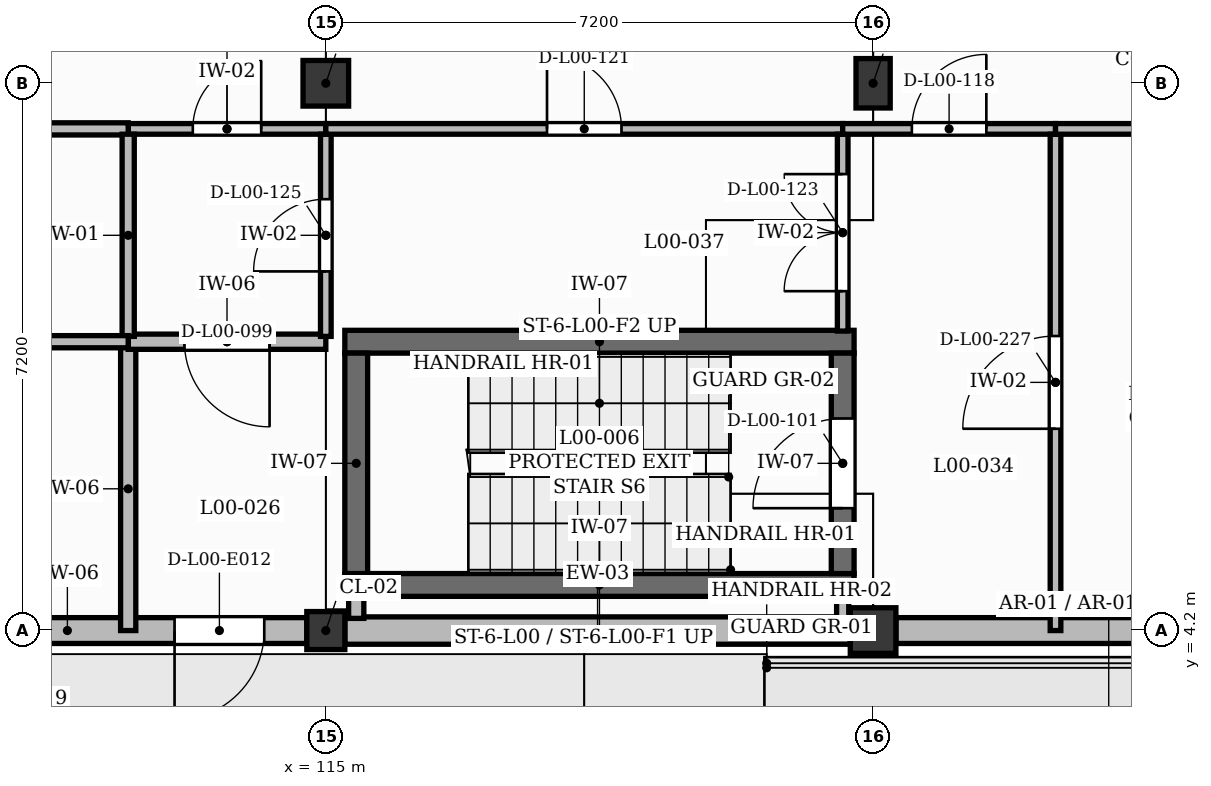
"""IFC4 building model, lengths in metres.
Left out: names, types, materials, properties, quantities, classifications, styles, units other than length and angle.
Written with IfcOpenShell. Run it as: python <this file> out.ifc"""

import sys

from ifc_helpers import new_model, si_unit, direction, frame, frame_2d, origin, origin_2d, place, context, subcontext, project, spatial, rectangle, extrude, element, fill, save


model = new_model("IFC4")
c1 = context("Model", 3, precision=1e-05, world=origin(), true_north=direction((0.0, 1.0)))
c2 = subcontext(c1, "Body", "Model", "MODEL_VIEW")
j1 = project(units=[si_unit("LENGTHUNIT", "METRE"), si_unit("PLANEANGLEUNIT", "RADIAN")], contexts=[c1])
p1 = place(None, origin())
s1 = spatial("IfcSite", under=j1, at=p1, CompositionType="ELEMENT")
p2 = place(p1, origin())
s2 = spatial("IfcBuilding", under=s1, at=p2, CompositionType="ELEMENT")
p3 = place(p2, origin())
s3 = spatial("IfcBuildingStorey", under=s2, at=p3, CompositionType="ELEMENT", Elevation=0.0)
p4 = place(p3, frame((115.0, 4.2, 0.0), z_axis=(0.0, 0.0, 1.0), x_axis=(1.0, 0.0, 0.0)))
e1 = element("IfcColumn", 1, at=p4, inside=s3, PredefinedType="COLUMN", context=c2, shape_type="SweptSolid", body=[
    extrude(rectangle(XDim=0.5, YDim=0.5, at=origin_2d()), origin(), (0.0, 0.0, 1.0), 4.2),
])
for number, where, z_axis, x_axis in (
    (2, (115.0, 11.4, 0.0), (0.0, 0.0, 1.0), (1.0, 0.0, 0.0)),
    (3, (122.2, 4.2, 0.0), (0.0, 0.0, 1.0), (1.0, 0.0, 0.0)),
):
    element("IfcColumn", number, at=place(p3, frame(where, z_axis=z_axis, x_axis=x_axis)), inside=s3, PredefinedType="COLUMN", context=c2, shape_type="SweptSolid", body=[
        extrude(rectangle(XDim=0.6, YDim=0.6, at=origin_2d()), origin(), (0.0, 0.0, 1.0), 4.2),
    ])
p5 = place(p3, frame((122.2, 11.4, 0.0), z_axis=(0.0, 0.0, 1.0), x_axis=(1.0, 0.0, 0.0)))
e4 = element("IfcColumn", 4, at=p5, inside=s3, PredefinedType="COLUMN", context=c2, shape_type="SweptSolid", body=[
    extrude(rectangle(XDim=0.45, YDim=0.65, at=origin_2d()), origin(), (0.0, 0.0, 1.0), 4.2),
])
p6 = place(p3, frame((108.025, 4.2, 0.0), z_axis=(0.0, 0.0, 1.0), x_axis=(1.0, 0.0, 0.0)))
e5 = element("IfcWall", 5, at=p6, inside=s3, PredefinedType="SOLIDWALL", context=c2, shape_type="SweptSolid", body=[
    extrude(rectangle(XDim=6.725, YDim=0.34, at=frame_2d((3.363, 0.0))), origin(), (0.0, 0.0, 1.0), 3.68),
])
p7 = place(p6, frame((4.985, 0.0, 0.0)))
e6 = element("IfcOpeningElement", 6, at=p7, cuts=e5, PredefinedType="OPENING", context=c2, shape_type="SweptSolid", body=[
    extrude(rectangle(XDim=1.18, YDim=2.2, at=frame_2d((0.59, 1.1))), frame((0.0, 0.18, 0.0), z_axis=(0.0, -1.0, 0.0), x_axis=(1.0, 0.0, 0.0)), (0.0, 0.0, 1.0), 0.36),
])
p8 = place(p6, frame((1.522, 0.0, 1.35)))
e7 = element("IfcOpeningElement", 7, at=p8, cuts=e5, PredefinedType="OPENING", context=c2, shape_type="SweptSolid", body=[
    extrude(rectangle(XDim=1.45, YDim=1.4, at=frame_2d((0.725, 0.7))), frame((0.0, 0.18, 0.0), z_axis=(0.0, -1.0, 0.0), x_axis=(1.0, 0.0, 0.0)), (0.0, 0.0, 1.0), 0.36),
])
p9 = place(p3, frame((115.25, 4.2, 0.0), z_axis=(0.0, 0.0, 1.0), x_axis=(1.0, 0.0, 0.0)))
e8 = element("IfcWall", 8, at=p9, inside=s3, PredefinedType="SOLIDWALL", context=c2, shape_type="SweptSolid", body=[
    extrude(rectangle(XDim=6.65, YDim=0.36, at=frame_2d((3.325, 0.0))), origin(), (0.0, 0.0, 1.0), 3.68),
])
p10 = place(p3, frame((122.5, 4.2, 0.0), z_axis=(0.0, 0.0, 1.0), x_axis=(1.0, 0.0, 0.0)))
e9 = element("IfcWall", 9, at=p10, inside=s3, PredefinedType="SOLIDWALL", context=c2, shape_type="SweptSolid", body=[
    extrude(rectangle(XDim=5.85, YDim=0.34, at=frame_2d((2.925, 0.0))), origin(), (0.0, 0.0, 1.0), 3.68),
])
p11 = place(p10, frame((3.305, 0.0, 1.0)))
e10 = element("IfcOpeningElement", 10, at=p11, cuts=e9, PredefinedType="OPENING", context=c2, shape_type="SweptSolid", body=[
    extrude(rectangle(XDim=1.22, YDim=2.2, at=frame_2d((0.61, 1.1))), frame((0.0, 0.18, 0.0), z_axis=(0.0, -1.0, 0.0), x_axis=(1.0, 0.0, 0.0)), (0.0, 0.0, 1.0), 0.36),
])
for number, where, z_axis, x_axis in (
    (11, (115.25, 4.8, 0.0), (0.0, 0.0, 1.0), (1.0, 0.0, 0.0)),
    (12, (115.25, 8.0, 0.0), (0.0, 0.0, 1.0), (1.0, 0.0, 0.0)),
):
    element("IfcWall", number, at=place(p3, frame(where, z_axis=z_axis, x_axis=x_axis)), inside=s3, PredefinedType="SHEAR", context=c2, shape_type="SweptSolid", body=[
        extrude(rectangle(XDim=6.7, YDim=0.3, at=frame_2d((3.35, 0.0))), origin(), (0.0, 0.0, 1.0), 4.25),
    ])
p12 = place(p3, frame((115.4, 4.95, 0.0), z_axis=(0.0, 0.0, 1.0), x_axis=(0.0, 1.0, 0.0)))
e13 = element("IfcWall", 13, at=p12, inside=s3, PredefinedType="SHEAR", context=c2, shape_type="SweptSolid", body=[
    extrude(rectangle(XDim=2.9, YDim=0.3, at=frame_2d((1.45, 0.0))), origin(), (0.0, 0.0, 1.0), 4.25),
])
p13 = place(p3, frame((121.8, 4.95, 0.0), z_axis=(0.0, 0.0, 1.0), x_axis=(0.0, 1.0, 0.0)))
e14 = element("IfcWall", 14, at=p13, inside=s3, PredefinedType="SHEAR", context=c2, shape_type="SweptSolid", body=[
    extrude(rectangle(XDim=2.9, YDim=0.3, at=frame_2d((1.45, 0.0))), origin(), (0.0, 0.0, 1.0), 4.25),
])
p14 = place(p13, frame((0.86, 0.0, 0.0)))
e15 = element("IfcOpeningElement", 15, at=p14, cuts=e14, PredefinedType="OPENING", context=c2, shape_type="SweptSolid", body=[
    extrude(rectangle(XDim=1.18, YDim=2.15, at=frame_2d((0.59, 1.075))), frame((0.0, 0.16, 0.0), z_axis=(0.0, -1.0, 0.0), x_axis=(1.0, 0.0, 0.0)), (0.0, 0.0, 1.0), 0.32),
])
p15 = place(p3, frame((112.4, 4.2, 0.0), z_axis=(0.0, 0.0, 1.0), x_axis=(0.0, 1.0, 0.0)))
e16 = element("IfcWall", 16, at=p15, inside=s3, PredefinedType="PARTITIONING", context=c2, shape_type="SweptSolid", body=[
    extrude(rectangle(XDim=3.73, YDim=0.2, at=frame_2d((1.865, 0.0))), origin(), (0.0, 0.0, 1.0), 4.18),
])
p16 = place(p3, frame((112.4, 8.0, 0.0), z_axis=(0.0, 0.0, 1.0), x_axis=(1.0, 0.0, 0.0)))
e17 = element("IfcWall", 17, at=p16, inside=s3, PredefinedType="PARTITIONING", context=c2, shape_type="SweptSolid", body=[
    extrude(rectangle(XDim=2.6, YDim=0.2, at=frame_2d((1.3, 0.0))), origin(), (0.0, 0.0, 1.0), 4.18),
])
p17 = place(p16, frame((0.74, 0.0, 0.0)))
e18 = element("IfcOpeningElement", 18, at=p17, cuts=e17, PredefinedType="OPENING", context=c2, shape_type="SweptSolid", body=[
    extrude(rectangle(XDim=1.12, YDim=2.1, at=frame_2d((0.56, 1.05))), frame((0.0, 0.11, 0.0), z_axis=(0.0, -1.0, 0.0), x_axis=(1.0, 0.0, 0.0)), (0.0, 0.0, 1.0), 0.22),
])
p18 = place(p3, frame((112.4, 10.8, 0.0), z_axis=(0.0, 0.0, 1.0), x_axis=(1.0, 0.0, 0.0)))
e19 = element("IfcWall", 19, at=p18, inside=s3, PredefinedType="PARTITIONING", context=c2, shape_type="SweptSolid", body=[
    extrude(rectangle(XDim=2.6, YDim=0.14, at=frame_2d((1.3, 0.0))), origin(), (0.0, 0.0, 1.0), 4.18),
])
p19 = place(p18, frame((0.85, 0.0, 0.0)))
e20 = element("IfcOpeningElement", 20, at=p19, cuts=e19, PredefinedType="OPENING", context=c2, shape_type="SweptSolid", body=[
    extrude(rectangle(XDim=0.9, YDim=2.1, at=frame_2d((0.45, 1.05))), frame((0.0, 0.08, 0.0), z_axis=(0.0, -1.0, 0.0), x_axis=(1.0, 0.0, 0.0)), (0.0, 0.0, 1.0), 0.16),
])
p20 = place(p3, frame((115.0, 8.07, 0.0), z_axis=(0.0, 0.0, 1.0), x_axis=(0.0, 1.0, 0.0)))
e21 = element("IfcWall", 21, at=p20, inside=s3, PredefinedType="PARTITIONING", context=c2, shape_type="SweptSolid", body=[
    extrude(rectangle(XDim=2.66, YDim=0.14, at=frame_2d((1.33, 0.0))), origin(), (0.0, 0.0, 1.0), 3.5),
])
p21 = place(p20, frame((0.855, 0.0, 0.0)))
e22 = element("IfcOpeningElement", 22, at=p21, cuts=e21, PredefinedType="OPENING", context=c2, shape_type="SweptSolid", body=[
    extrude(rectangle(XDim=0.95, YDim=2.1, at=frame_2d((0.475, 1.05))), frame((0.0, 0.08, 0.0), z_axis=(0.0, -1.0, 0.0), x_axis=(1.0, 0.0, 0.0)), (0.0, 0.0, 1.0), 0.16),
])
p22 = place(p3, frame((115.0, 10.8, 0.0), z_axis=(0.0, 0.0, 1.0), x_axis=(1.0, 0.0, 0.0)))
e23 = element("IfcWall", 23, at=p22, inside=s3, PredefinedType="PARTITIONING", context=c2, shape_type="SweptSolid", body=[
    extrude(rectangle(XDim=6.8, YDim=0.14, at=frame_2d((3.4, 0.0))), origin(), (0.0, 0.0, 1.0), 4.18),
])
p23 = place(p22, frame((2.91, 0.0, 0.0)))
e24 = element("IfcOpeningElement", 24, at=p23, cuts=e23, PredefinedType="OPENING", context=c2, shape_type="SweptSolid", body=[
    extrude(rectangle(XDim=0.98, YDim=2.15, at=frame_2d((0.49, 1.075))), frame((0.0, 0.08, 0.0), z_axis=(0.0, -1.0, 0.0), x_axis=(1.0, 0.0, 0.0)), (0.0, 0.0, 1.0), 0.16),
])
p24 = place(p3, frame((121.8, 8.14, 0.0), z_axis=(0.0, 0.0, 1.0), x_axis=(0.0, 1.0, 0.0)))
e25 = element("IfcWall", 25, at=p24, inside=s3, PredefinedType="PARTITIONING", context=c2, shape_type="SweptSolid", body=[
    extrude(rectangle(XDim=2.59, YDim=0.14, at=frame_2d((1.295, 0.0))), origin(), (0.0, 0.0, 1.0), 4.18),
])
p25 = place(p24, frame((0.525, 0.0, 0.0)))
e26 = element("IfcOpeningElement", 26, at=p25, cuts=e25, PredefinedType="OPENING", context=c2, shape_type="SweptSolid", body=[
    extrude(rectangle(XDim=1.54, YDim=2.25, at=frame_2d((0.77, 1.125))), frame((0.0, 0.08, 0.0), z_axis=(0.0, -1.0, 0.0), x_axis=(1.0, 0.0, 0.0)), (0.0, 0.0, 1.0), 0.16),
])
p26 = place(p3, frame((121.8, 10.8, 0.0), z_axis=(0.0, 0.0, 1.0), x_axis=(1.0, 0.0, 0.0)))
e27 = element("IfcWall", 27, at=p26, inside=s3, PredefinedType="PARTITIONING", context=c2, shape_type="SweptSolid", body=[
    extrude(rectangle(XDim=2.8, YDim=0.14, at=frame_2d((1.4, 0.0))), origin(), (0.0, 0.0, 1.0), 4.18),
])
p27 = place(p26, frame((0.91, 0.0, 0.0)))
e28 = element("IfcOpeningElement", 28, at=p27, cuts=e27, PredefinedType="OPENING", context=c2, shape_type="SweptSolid", body=[
    extrude(rectangle(XDim=0.98, YDim=2.15, at=frame_2d((0.49, 1.075))), frame((0.0, 0.08, 0.0), z_axis=(0.0, -1.0, 0.0), x_axis=(1.0, 0.0, 0.0)), (0.0, 0.0, 1.0), 0.16),
])
p28 = place(p3, frame((124.6, 4.2, 0.0), z_axis=(0.0, 0.0, 1.0), x_axis=(0.0, 1.0, 0.0)))
e29 = element("IfcWall", 29, at=p28, inside=s3, PredefinedType="PARTITIONING", context=c2, shape_type="SweptSolid", body=[
    extrude(rectangle(XDim=6.53, YDim=0.14, at=frame_2d((3.265, 0.0))), origin(), (0.0, 0.0, 1.0), 4.18),
])
p29 = place(p28, frame((2.655, 0.0, 0.0)))
e30 = element("IfcOpeningElement", 30, at=p29, cuts=e29, PredefinedType="OPENING", context=c2, shape_type="SweptSolid", body=[
    extrude(rectangle(XDim=1.22, YDim=2.1, at=frame_2d((0.61, 1.05))), frame((0.0, 0.08, 0.0), z_axis=(0.0, -1.0, 0.0), x_axis=(1.0, 0.0, 0.0)), (0.0, 0.0, 1.0), 0.16),
])
p30 = place(p3, frame((124.6, 10.8, 0.0), z_axis=(0.0, 0.0, 1.0), x_axis=(1.0, 0.0, 0.0)))
e31 = element("IfcWall", 31, at=p30, inside=s3, PredefinedType="PARTITIONING", context=c2, shape_type="SweptSolid", body=[
    extrude(rectangle(XDim=4.795, YDim=0.14, at=frame_2d((2.397, 0.0))), origin(), (0.0, 0.0, 1.0), 4.18),
])
p31 = place(p3, frame((115.4, 4.36, 0.0), z_axis=(0.0, 0.0, 1.0), x_axis=(0.0, 1.0, 0.0)))
e32 = element("IfcWall", 32, at=p31, inside=s3, PredefinedType="PARTITIONING", context=c2, shape_type="SweptSolid", body=[
    extrude(rectangle(XDim=0.3, YDim=0.2, at=frame_2d((0.15, 0.0))), origin(), (0.0, 0.0, 1.0), 4.18),
])
p32 = place(p3, frame((107.8, 10.8, 0.0), z_axis=(0.0, 0.0, 1.0), x_axis=(1.0, 0.0, 0.0)))
e33 = element("IfcWall", 33, at=p32, inside=s3, PredefinedType="PARTITIONING", context=c2, shape_type="SweptSolid", body=[
    extrude(rectangle(XDim=4.6, YDim=0.16, at=frame_2d((2.3, 0.0))), origin(), (0.0, 0.0, 1.0), 4.18),
])
p33 = place(p3, frame((121.8, 4.2, 0.0), z_axis=(0.0, 0.0, 1.0), x_axis=(0.0, 1.0, 0.0)))
e34 = element("IfcWall", 34, at=p33, inside=s3, PredefinedType="PARTITIONING", context=c2, shape_type="SweptSolid", body=[
    extrude(rectangle(XDim=0.46, YDim=0.16, at=frame_2d((0.23, 0.0))), origin(), (0.0, 0.0, 1.0), 4.18),
])
p34 = place(p3, frame((112.4, 8.07, 0.0), z_axis=(0.0, 0.0, 1.0), x_axis=(0.0, 1.0, 0.0)))
e35 = element("IfcWall", 35, at=p34, inside=s3, PredefinedType="PARTITIONING", context=c2, shape_type="SweptSolid", body=[
    extrude(rectangle(XDim=2.66, YDim=0.16, at=frame_2d((1.33, 0.0))), origin(), (0.0, 0.0, 1.0), 4.18),
])
p35 = place(p3, frame((112.4, 8.0, 0.0), z_axis=(0.0, 0.0, 1.0), x_axis=(-1.0, 0.0, 0.0)))
e36 = element("IfcWall", 36, at=p35, inside=s3, PredefinedType="PARTITIONING", context=c2, shape_type="SweptSolid", body=[
    extrude(rectangle(XDim=4.6, YDim=0.16, at=frame_2d((2.3, 0.0))), origin(), (0.0, 0.0, 1.0), 4.18),
])
p36 = place(p7, frame((1.18, 0.0, 0.0), z_axis=(0.0, 0.0, 1.0), x_axis=(-1.0, 0.0, 0.0)))
e37 = element("IfcDoor", 37, at=p36, inside=s3, OperationType="SINGLE_SWING_RIGHT", PredefinedType="DOOR", context=c2, shape_type="SweptSolid", body=[
    extrude(rectangle(XDim=1.18, YDim=2.2, at=frame_2d((0.59, 1.1))), frame((0.0, 0.025, 0.0), z_axis=(0.0, -1.0, 0.0), x_axis=(1.0, 0.0, 0.0)), (0.0, 0.0, 1.0), 0.05),
])
fill(e6, e37)
p37 = place(p17, frame((1.12, 0.0, 0.0), z_axis=(0.0, 0.0, 1.0), x_axis=(-1.0, 0.0, 0.0)))
e38 = element("IfcDoor", 38, at=p37, inside=s3, OperationType="SINGLE_SWING_LEFT", PredefinedType="DOOR", context=c2, shape_type="SweptSolid", body=[
    extrude(rectangle(XDim=1.12, YDim=2.1, at=frame_2d((0.56, 1.05))), frame((0.0, 0.025, 0.0), z_axis=(0.0, -1.0, 0.0), x_axis=(1.0, 0.0, 0.0)), (0.0, 0.0, 1.0), 0.05),
])
fill(e18, e38)
p38 = place(p14, origin())
e39 = element("IfcDoor", 39, at=p38, inside=s3, OperationType="SINGLE_SWING_LEFT", PredefinedType="DOOR", context=c2, shape_type="SweptSolid", body=[
    extrude(rectangle(XDim=1.18, YDim=2.15, at=frame_2d((0.59, 1.075))), frame((0.0, 0.025, 0.0), z_axis=(0.0, -1.0, 0.0), x_axis=(1.0, 0.0, 0.0)), (0.0, 0.0, 1.0), 0.05),
])
fill(e15, e39)
p39 = place(p27, origin())
e40 = element("IfcDoor", 40, at=p39, inside=s3, OperationType="SINGLE_SWING_RIGHT", PredefinedType="DOOR", context=c2, shape_type="SweptSolid", body=[
    extrude(rectangle(XDim=0.98, YDim=2.15, at=frame_2d((0.49, 1.075))), frame((0.0, 0.025, 0.0), z_axis=(0.0, -1.0, 0.0), x_axis=(1.0, 0.0, 0.0)), (0.0, 0.0, 1.0), 0.05),
])
fill(e28, e40)
p40 = place(p19, origin())
e41 = element("IfcDoor", 41, at=p40, inside=s3, OperationType="SINGLE_SWING_RIGHT", PredefinedType="DOOR", context=c2, shape_type="SweptSolid", body=[
    extrude(rectangle(XDim=0.9, YDim=2.1, at=frame_2d((0.45, 1.05))), frame((0.0, 0.025, 0.0), z_axis=(0.0, -1.0, 0.0), x_axis=(1.0, 0.0, 0.0)), (0.0, 0.0, 1.0), 0.05),
])
fill(e20, e41)
p41 = place(p23, origin())
e42 = element("IfcDoor", 42, at=p41, inside=s3, OperationType="SINGLE_SWING_LEFT", PredefinedType="DOOR", context=c2, shape_type="SweptSolid", body=[
    extrude(rectangle(XDim=0.98, YDim=2.15, at=frame_2d((0.49, 1.075))), frame((0.0, 0.025, 0.0), z_axis=(0.0, -1.0, 0.0), x_axis=(1.0, 0.0, 0.0)), (0.0, 0.0, 1.0), 0.05),
])
fill(e24, e42)
p42 = place(p25, origin())
e43 = element("IfcDoor", 43, at=p42, inside=s3, OperationType="DOUBLE_DOOR_SINGLE_SWING", PredefinedType="DOOR", context=c2, shape_type="SweptSolid", body=[
    extrude(rectangle(XDim=1.54, YDim=2.25, at=frame_2d((0.77, 1.125))), frame((0.0, 0.025, 0.0), z_axis=(0.0, -1.0, 0.0), x_axis=(1.0, 0.0, 0.0)), (0.0, 0.0, 1.0), 0.05),
])
fill(e26, e43)
p43 = place(p21, origin())
e44 = element("IfcDoor", 44, at=p43, inside=s3, OperationType="SINGLE_SWING_LEFT", PredefinedType="DOOR", context=c2, shape_type="SweptSolid", body=[
    extrude(rectangle(XDim=0.95, YDim=2.1, at=frame_2d((0.475, 1.05))), frame((0.0, 0.025, 0.0), z_axis=(0.0, -1.0, 0.0), x_axis=(1.0, 0.0, 0.0)), (0.0, 0.0, 1.0), 0.05),
])
fill(e22, e44)
p44 = place(p29, origin())
e45 = element("IfcDoor", 45, at=p44, inside=s3, OperationType="SINGLE_SWING_LEFT", PredefinedType="DOOR", context=c2, shape_type="SweptSolid", body=[
    extrude(rectangle(XDim=1.22, YDim=2.1, at=frame_2d((0.61, 1.05))), frame((0.0, 0.025, 0.0), z_axis=(0.0, -1.0, 0.0), x_axis=(1.0, 0.0, 0.0)), (0.0, 0.0, 1.0), 0.05),
])
fill(e30, e45)
save(model, sys.argv[1])
